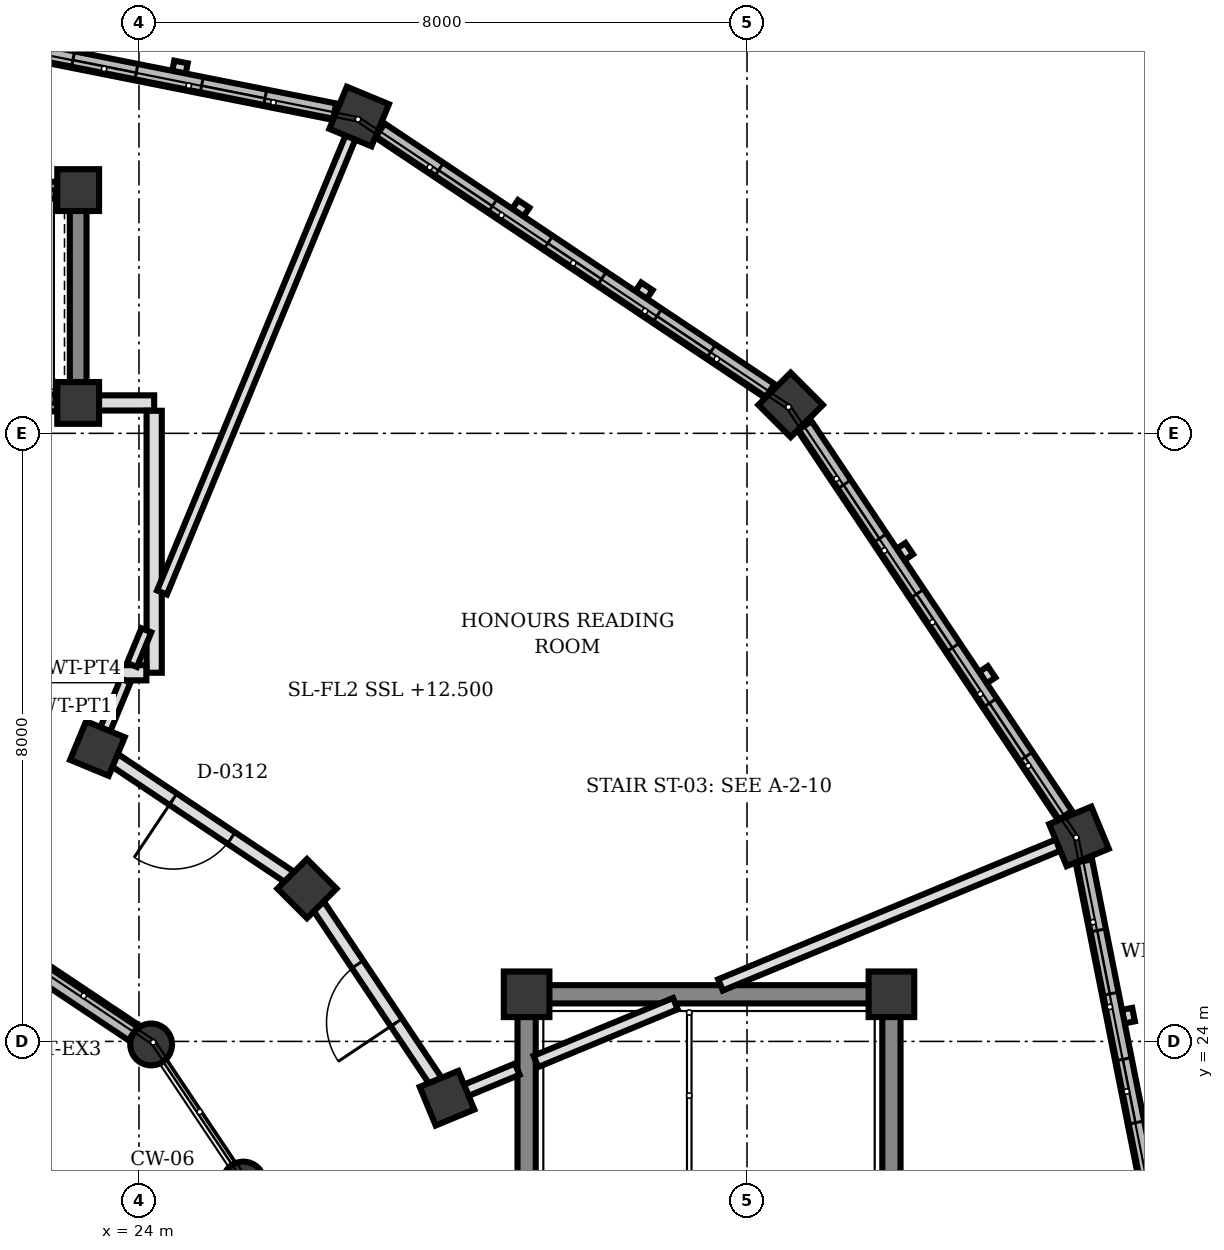
"""IFC4 building model, lengths in metres.
Left out: names, types, materials, properties, quantities, classifications, styles, units other than length and angle.
Written with IfcOpenShell. Run it as: python <this file> out.ifc"""

import sys

from ifc_helpers import new_model, si_unit, direction, frame, frame_2d, origin, origin_2d, place, context, subcontext, project, spatial, rectangle, circle, extrude, element, fill, save


model = new_model("IFC4")
c1 = context("Model", 3, precision=1e-05, world=origin(), true_north=direction((0.0, 1.0)))
c2 = subcontext(c1, "Body", "Model", "MODEL_VIEW")
j1 = project(units=[si_unit("LENGTHUNIT", "METRE"), si_unit("PLANEANGLEUNIT", "RADIAN")], contexts=[c1])
p1 = place(None, origin())
s1 = spatial("IfcSite", under=j1, at=p1, CompositionType="ELEMENT")
p2 = place(p1, origin())
s2 = spatial("IfcBuilding", under=s1, at=p2, CompositionType="ELEMENT")
p3 = place(p2, frame((0.0, 0.0, 12.5)))
s3 = spatial("IfcBuildingStorey", under=s2, at=p3, CompositionType="ELEMENT", Elevation=12.5)
for number, where, z_axis, x_axis in (
    (1, (33.9, 24.62, 0.0), (0.0, 0.0, 1.0), (1.0, 0.0, 0.0)),
    (2, (29.1, 24.62, 0.0), (0.0, 0.0, 1.0), (1.0, 0.0, 0.0)),
):
    element("IfcColumn", number, at=place(p3, frame(where, z_axis=z_axis, x_axis=x_axis)), inside=s3, PredefinedType="COLUMN", context=c2, shape_type="SweptSolid", body=[
        extrude(rectangle(XDim=0.6, YDim=0.6, at=origin_2d()), origin(), (0.0, 0.0, 1.0), 4.0),
    ])
for number, where, z_axis, x_axis in (
    (3, (23.2, 32.4, 0.0), (0.0, 0.0, 1.0), (1.0, 0.0, 0.0)),
    (4, (23.2, 35.2, 0.0), (0.0, 0.0, 1.0), (1.0, 0.0, 0.0)),
):
    element("IfcColumn", number, at=place(p3, frame(where, z_axis=z_axis, x_axis=x_axis)), inside=s3, PredefinedType="COLUMN", context=c2, shape_type="SweptSolid", body=[
        extrude(rectangle(XDim=0.55, YDim=0.55, at=origin_2d()), origin(), (0.0, 0.0, 1.0), 4.0),
    ])
for number, where, z_axis, x_axis in (
    (5, (25.374, 22.143, 0.0), (0.0, 0.0, 1.0), (1.0, 0.0, 0.0)),
    (6, (24.16, 23.96, 0.0), (0.0, 0.0, 1.0), (1.0, 0.0, 0.0)),
):
    element("IfcColumn", number, at=place(p3, frame(where, z_axis=z_axis, x_axis=x_axis)), inside=s3, PredefinedType="COLUMN", context=c2, shape_type="SweptSolid", body=[
        extrude(circle(Radius=0.275, at=origin_2d()), origin(), (0.0, 0.0, 1.0), 3.865),
    ])
for number, where, z_axis, x_axis in (
    (7, (28.053, 23.253, 0.0), (0.0, 0.0, 1.0), (0.924, 0.383, 0.0)),
    (8, (26.21, 26.01, 0.0), (0.0, 0.0, 1.0), (0.707, 0.707, 0.0)),
    (9, (23.453, 27.853, 0.0), (0.0, 0.0, 1.0), (0.383, 0.924, 0.0)),
):
    element("IfcColumn", number, at=place(p3, frame(where, z_axis=z_axis, x_axis=x_axis)), inside=s3, PredefinedType="COLUMN", context=c2, shape_type="SweptSolid", body=[
        extrude(rectangle(XDim=0.55, YDim=0.55, at=origin_2d()), origin(), (0.0, 0.0, 1.0), 4.59),
    ])
for number, where, z_axis, x_axis in (
    (10, (36.368, 26.697, 0.0), (0.0, 0.0, 1.0), (0.924, 0.383, 0.0)),
    (11, (32.574, 32.374, 0.0), (0.0, 0.0, 1.0), (0.707, 0.707, 0.0)),
    (12, (26.897, 36.168, 0.0), (0.0, 0.0, 1.0), (0.383, 0.924, 0.0)),
):
    element("IfcColumn", number, at=place(p3, frame(where, z_axis=z_axis, x_axis=x_axis)), inside=s3, PredefinedType="COLUMN", context=c2, shape_type="SweptSolid", body=[
        extrude(rectangle(XDim=0.6, YDim=0.6, at=origin_2d()), origin(), (0.0, 0.0, 1.0), 6.84),
    ])
p4 = place(p3, frame((36.432, 26.374, 0.0), z_axis=(0.0, 0.0, 1.0), x_axis=(0.195164813773, -0.980770460131, 0.0)))
e13 = element("IfcWall", 13, at=p4, inside=s3, PredefinedType="SOLIDWALL", context=c2, shape_type="SweptSolid", body=[
    extrude(rectangle(XDim=6.17, YDim=0.22, at=frame_2d((3.085, 0.0))), origin(), (0.0, 0.0, 1.0), 6.35),
])
p5 = place(p4, frame((0.932, 0.0, 0.85)))
e14 = element("IfcOpeningElement", 14, at=p5, cuts=e13, PredefinedType="OPENING", context=c2, shape_type="SweptSolid", body=[
    extrude(rectangle(XDim=0.85, YDim=1.25, at=frame_2d((0.425, 0.625))), frame((0.0, 0.12, 0.0), z_axis=(0.0, -1.0, 0.0), x_axis=(1.0, 0.0, 0.0)), (0.0, 0.0, 1.0), 0.24),
])
p6 = place(p4, frame((2.66, 0.0, 0.85)))
e15 = element("IfcOpeningElement", 15, at=p6, cuts=e13, PredefinedType="OPENING", context=c2, shape_type="SweptSolid", body=[
    extrude(rectangle(XDim=0.85, YDim=1.25, at=frame_2d((0.425, 0.625))), frame((0.0, 0.12, 0.0), z_axis=(0.0, -1.0, 0.0), x_axis=(1.0, 0.0, 0.0)), (0.0, 0.0, 1.0), 0.24),
])
p7 = place(p4, frame((4.387, 0.0, 0.85)))
e16 = element("IfcOpeningElement", 16, at=p7, cuts=e13, PredefinedType="OPENING", context=c2, shape_type="SweptSolid", body=[
    extrude(rectangle(XDim=0.85, YDim=1.25, at=frame_2d((0.425, 0.625))), frame((0.0, 0.12, 0.0), z_axis=(0.0, -1.0, 0.0), x_axis=(1.0, 0.0, 0.0)), (0.0, 0.0, 1.0), 0.24),
])
p8 = place(p3, frame((32.757, 32.1, 0.0), z_axis=(0.0, 0.0, 1.0), x_axis=(0.555658736667, -0.831410469242, 0.0)))
e17 = element("IfcWall", 17, at=p8, inside=s3, PredefinedType="SOLIDWALL", context=c2, shape_type="SweptSolid", body=[
    extrude(rectangle(XDim=6.169, YDim=0.22, at=frame_2d((3.084, 0.0))), origin(), (0.0, 0.0, 1.0), 6.35),
])
p9 = place(p8, frame((0.932, 0.0, 0.85)))
e18 = element("IfcOpeningElement", 18, at=p9, cuts=e17, PredefinedType="OPENING", context=c2, shape_type="SweptSolid", body=[
    extrude(rectangle(XDim=0.85, YDim=1.25, at=frame_2d((0.425, 0.625))), frame((0.0, 0.12, 0.0), z_axis=(0.0, -1.0, 0.0), x_axis=(1.0, 0.0, 0.0)), (0.0, 0.0, 1.0), 0.24),
])
p10 = place(p8, frame((2.66, 0.0, 0.85)))
e19 = element("IfcOpeningElement", 19, at=p10, cuts=e17, PredefinedType="OPENING", context=c2, shape_type="SweptSolid", body=[
    extrude(rectangle(XDim=0.85, YDim=1.25, at=frame_2d((0.425, 0.625))), frame((0.0, 0.12, 0.0), z_axis=(0.0, -1.0, 0.0), x_axis=(1.0, 0.0, 0.0)), (0.0, 0.0, 1.0), 0.24),
])
p11 = place(p8, frame((4.387, 0.0, 0.85)))
e20 = element("IfcOpeningElement", 20, at=p11, cuts=e17, PredefinedType="OPENING", context=c2, shape_type="SweptSolid", body=[
    extrude(rectangle(XDim=0.85, YDim=1.25, at=frame_2d((0.425, 0.625))), frame((0.0, 0.12, 0.0), z_axis=(0.0, -1.0, 0.0), x_axis=(1.0, 0.0, 0.0)), (0.0, 0.0, 1.0), 0.24),
])
p12 = place(p3, frame((27.171, 35.985, 0.0), z_axis=(0.0, 0.0, 1.0), x_axis=(0.831392186772, -0.55568609104, 0.0)))
e21 = element("IfcWall", 21, at=p12, inside=s3, PredefinedType="SOLIDWALL", context=c2, shape_type="SweptSolid", body=[
    extrude(rectangle(XDim=6.169, YDim=0.22, at=frame_2d((3.085, 0.0))), origin(), (0.0, 0.0, 1.0), 6.35),
])
p13 = place(p12, frame((0.932, 0.0, 0.85)))
e22 = element("IfcOpeningElement", 22, at=p13, cuts=e21, PredefinedType="OPENING", context=c2, shape_type="SweptSolid", body=[
    extrude(rectangle(XDim=0.85, YDim=1.25, at=frame_2d((0.425, 0.625))), frame((0.0, 0.12, 0.0), z_axis=(0.0, -1.0, 0.0), x_axis=(1.0, 0.0, 0.0)), (0.0, 0.0, 1.0), 0.24),
])
p14 = place(p12, frame((2.66, 0.0, 0.85)))
e23 = element("IfcOpeningElement", 23, at=p14, cuts=e21, PredefinedType="OPENING", context=c2, shape_type="SweptSolid", body=[
    extrude(rectangle(XDim=0.85, YDim=1.25, at=frame_2d((0.425, 0.625))), frame((0.0, 0.12, 0.0), z_axis=(0.0, -1.0, 0.0), x_axis=(1.0, 0.0, 0.0)), (0.0, 0.0, 1.0), 0.24),
])
p15 = place(p12, frame((4.387, 0.0, 0.85)))
e24 = element("IfcOpeningElement", 24, at=p15, cuts=e21, PredefinedType="OPENING", context=c2, shape_type="SweptSolid", body=[
    extrude(rectangle(XDim=0.85, YDim=1.25, at=frame_2d((0.425, 0.625))), frame((0.0, 0.12, 0.0), z_axis=(0.0, -1.0, 0.0), x_axis=(1.0, 0.0, 0.0)), (0.0, 0.0, 1.0), 0.24),
])
p16 = place(p3, frame((23.93, 24.114, 0.0), z_axis=(0.0, 0.0, 1.0), x_axis=(-0.83165874011, 0.555287078904, 0.0)))
e25 = element("IfcWall", 25, at=p16, inside=s3, PredefinedType="SOLIDWALL", context=c2, shape_type="SweptSolid", body=[
    extrude(rectangle(XDim=1.632, YDim=0.24, at=frame_2d((0.816, 0.0))), origin(), (0.0, 0.0, 1.0), 3.375),
])
p17 = place(p3, frame((20.523, 37.436, 0.0), z_axis=(0.0, 0.0, 1.0), x_axis=(0.980770460131, -0.195164813773, 0.0)))
e26 = element("IfcWall", 26, at=p17, inside=s3, PredefinedType="SOLIDWALL", context=c2, shape_type="SweptSolid", body=[
    extrude(rectangle(XDim=6.17, YDim=0.22, at=frame_2d((3.085, 0.0))), origin(), (0.0, 0.0, 1.0), 6.35),
])
p18 = place(p17, frame((0.932, 0.0, 0.85)))
e27 = element("IfcOpeningElement", 27, at=p18, cuts=e26, PredefinedType="OPENING", context=c2, shape_type="SweptSolid", body=[
    extrude(rectangle(XDim=0.85, YDim=1.25, at=frame_2d((0.425, 0.625))), frame((0.0, 0.12, 0.0), z_axis=(0.0, -1.0, 0.0), x_axis=(1.0, 0.0, 0.0)), (0.0, 0.0, 1.0), 0.24),
])
p19 = place(p17, frame((2.66, 0.0, 0.85)))
e28 = element("IfcOpeningElement", 28, at=p19, cuts=e26, PredefinedType="OPENING", context=c2, shape_type="SweptSolid", body=[
    extrude(rectangle(XDim=0.85, YDim=1.25, at=frame_2d((0.425, 0.625))), frame((0.0, 0.12, 0.0), z_axis=(0.0, -1.0, 0.0), x_axis=(1.0, 0.0, 0.0)), (0.0, 0.0, 1.0), 0.24),
])
p20 = place(p17, frame((4.387, 0.0, 0.85)))
e29 = element("IfcOpeningElement", 29, at=p20, cuts=e26, PredefinedType="OPENING", context=c2, shape_type="SweptSolid", body=[
    extrude(rectangle(XDim=0.85, YDim=1.25, at=frame_2d((0.425, 0.625))), frame((0.0, 0.12, 0.0), z_axis=(0.0, -1.0, 0.0), x_axis=(1.0, 0.0, 0.0)), (0.0, 0.0, 1.0), 0.24),
])
p21 = place(p3, frame((29.1, 16.192, 0.0), z_axis=(0.0, 0.0, 1.0), x_axis=(0.0, 1.0, 0.0)))
e30 = element("IfcWall", 30, at=p21, inside=s3, PredefinedType="SHEAR", context=c2, shape_type="SweptSolid", body=[
    extrude(rectangle(XDim=8.136, YDim=0.24, at=frame_2d((4.068, 0.0))), origin(), (0.0, 0.0, 1.0), 3.74),
])
p22 = place(p21, frame((1.012, 0.0, 0.0)))
e31 = element("IfcOpeningElement", 31, at=p22, cuts=e30, PredefinedType="OPENING", context=c2, shape_type="SweptSolid", body=[
    extrude(rectangle(XDim=0.88, YDim=2.1, at=frame_2d((0.44, 1.05))), frame((0.0, 0.13, 0.0), z_axis=(0.0, -1.0, 0.0), x_axis=(1.0, 0.0, 0.0)), (0.0, 0.0, 1.0), 0.26),
])
p23 = place(p3, frame((33.9, 24.328, 0.0), z_axis=(0.0, 0.0, 1.0), x_axis=(0.0, -1.0, 0.0)))
e32 = element("IfcWall", 32, at=p23, inside=s3, PredefinedType="SHEAR", context=c2, shape_type="SweptSolid", body=[
    extrude(rectangle(XDim=8.136, YDim=0.24, at=frame_2d((4.068, 0.0))), origin(), (0.0, 0.0, 1.0), 3.74),
])
p24 = place(p3, frame((33.608, 24.62, 0.0), z_axis=(0.0, 0.0, 1.0), x_axis=(-1.0, 0.0, 0.0)))
e33 = element("IfcWall", 33, at=p24, inside=s3, PredefinedType="SHEAR", context=c2, shape_type="SweptSolid", body=[
    extrude(rectangle(XDim=4.216, YDim=0.24, at=frame_2d((2.108, 0.0))), origin(), (0.0, 0.0, 1.0), 3.74),
])
p25 = place(p3, frame((20.867, 32.4, 0.0), z_axis=(0.0, 0.0, 1.0), x_axis=(1.0, 0.0, 0.0)))
e34 = element("IfcWall", 34, at=p25, inside=s3, PredefinedType="SHEAR", context=c2, shape_type="SweptSolid", body=[
    extrude(rectangle(XDim=2.066, YDim=0.22, at=frame_2d((1.033, 0.0))), origin(), (0.0, 0.0, 1.0), 3.74),
])
p26 = place(p25, frame((0.483, 0.0, 0.0)))
e35 = element("IfcOpeningElement", 35, at=p26, cuts=e34, PredefinedType="OPENING", context=c2, shape_type="SweptSolid", body=[
    extrude(rectangle(XDim=1.1, YDim=2.15, at=frame_2d((0.55, 1.075))), frame((0.0, 0.12, 0.0), z_axis=(0.0, -1.0, 0.0), x_axis=(1.0, 0.0, 0.0)), (0.0, 0.0, 1.0), 0.24),
])
p27 = place(p3, frame((23.2, 32.667, 0.0), z_axis=(0.0, 0.0, 1.0), x_axis=(0.0, 1.0, 0.0)))
e36 = element("IfcWall", 36, at=p27, inside=s3, PredefinedType="SHEAR", context=c2, shape_type="SweptSolid", body=[
    extrude(rectangle(XDim=2.266, YDim=0.22, at=frame_2d((1.133, 0.0))), origin(), (0.0, 0.0, 1.0), 3.74),
])
p28 = place(p3, frame((22.933, 35.2, 0.0), z_axis=(0.0, 0.0, 1.0), x_axis=(-1.0, 0.0, 0.0)))
e37 = element("IfcWall", 37, at=p28, inside=s3, PredefinedType="SHEAR", context=c2, shape_type="SweptSolid", body=[
    extrude(rectangle(XDim=2.066, YDim=0.22, at=frame_2d((1.033, 0.0))), origin(), (0.0, 0.0, 1.0), 3.74),
])
p29 = place(p3, frame((23.467, 32.4, 0.0), z_axis=(0.0, 0.0, 1.0), x_axis=(1.0, 0.0, 0.0)))
e38 = element("IfcWall", 38, at=p29, inside=s3, PredefinedType="PARTITIONING", context=c2, shape_type="SweptSolid", body=[
    extrude(rectangle(XDim=0.733, YDim=0.2, at=frame_2d((0.366, 0.0))), origin(), (0.0, 0.0, 1.0), 3.7),
])
p30 = place(p3, frame((24.2, 28.85, 0.0), z_axis=(0.0, 0.0, 1.0), x_axis=(0.0, 1.0, 0.0)))
e39 = element("IfcWall", 39, at=p30, inside=s3, PredefinedType="PARTITIONING", context=c2, shape_type="SweptSolid", body=[
    extrude(rectangle(XDim=3.447, YDim=0.2, at=frame_2d((1.724, 0.0))), origin(), (0.0, 0.0, 1.0), 3.7),
])
p31 = place(p3, frame((24.097, 28.85, 0.0), z_axis=(0.0, 0.0, 1.0), x_axis=(-1.0, 0.0, 0.0)))
e40 = element("IfcWall", 40, at=p31, inside=s3, PredefinedType="PARTITIONING", context=c2, shape_type="SweptSolid", body=[
    extrude(rectangle(XDim=3.394, YDim=0.2, at=frame_2d((1.697, 0.0))), origin(), (0.0, 0.0, 1.0), 3.7),
])
p32 = place(p31, frame((1.519, 0.0, 0.0)))
e41 = element("IfcOpeningElement", 41, at=p32, cuts=e40, PredefinedType="OPENING", context=c2, shape_type="SweptSolid", body=[
    extrude(rectangle(XDim=0.9, YDim=2.2, at=frame_2d((0.45, 1.1))), frame((0.0, 0.11, 0.0), z_axis=(0.0, -1.0, 0.0), x_axis=(1.0, 0.0, 0.0)), (0.0, 0.0, 1.0), 0.22),
])
p33 = place(p3, frame((28.3, 23.355, 0.0), z_axis=(0.0, 0.0, 1.0), x_axis=(0.924069600435, 0.382224245113, 0.0)))
e42 = element("IfcWall", 42, at=p33, inside=s3, PredefinedType="PARTITIONING", context=c2, shape_type="SweptSolid", body=[
    extrude(rectangle(XDim=0.733, YDim=0.16, at=frame_2d((0.366, 0.0))), origin(), (0.0, 0.0, 1.0), 3.7),
])
p34 = place(p3, frame((29.223, 23.737, 0.0), z_axis=(0.0, 0.0, 1.0), x_axis=(0.923817443679, 0.382833293686, 0.0)))
e43 = element("IfcWall", 43, at=p34, inside=s3, PredefinedType="PARTITIONING", context=c2, shape_type="SweptSolid", body=[
    extrude(rectangle(XDim=1.985, YDim=0.16, at=frame_2d((0.993, 0.0))), origin(), (0.0, 0.0, 1.0), 3.7),
])
p35 = place(p3, frame((31.651, 24.743, 0.0), z_axis=(0.0, 0.0, 1.0), x_axis=(0.923877739946, 0.382687759972, 0.0)))
e44 = element("IfcWall", 44, at=p35, inside=s3, PredefinedType="PARTITIONING", context=c2, shape_type="SweptSolid", body=[
    extrude(rectangle(XDim=4.813, YDim=0.16, at=frame_2d((2.407, 0.0))), origin(), (0.0, 0.0, 1.0), 3.7),
])
p36 = place(p3, frame((23.555, 28.1, 0.0), z_axis=(0.0, 0.0, 1.0), x_axis=(0.38278283439, 0.923838352579, 0.0)))
e45 = element("IfcWall", 45, at=p36, inside=s3, PredefinedType="PARTITIONING", context=c2, shape_type="SweptSolid", body=[
    extrude(rectangle(XDim=0.7, YDim=0.14, at=frame_2d((0.35, 0.0))), origin(), (0.0, 0.0, 1.0), 3.7),
])
p37 = place(p3, frame((23.908, 28.953, 0.0), z_axis=(0.0, 0.0, 1.0), x_axis=(0.3827885685, 0.92383597669, 0.0)))
e46 = element("IfcWall", 46, at=p37, inside=s3, PredefinedType="PARTITIONING", context=c2, shape_type="SweptSolid", body=[
    extrude(rectangle(XDim=0.494, YDim=0.14, at=frame_2d((0.247, 0.0))), origin(), (0.0, 0.0, 1.0), 3.7),
])
p38 = place(p3, frame((24.303, 29.906, 0.0), z_axis=(0.0, 0.0, 1.0), x_axis=(0.382682035927, 0.923880110934, 0.0)))
e47 = element("IfcWall", 47, at=p38, inside=s3, PredefinedType="PARTITIONING", context=c2, shape_type="SweptSolid", body=[
    extrude(rectangle(XDim=6.486, YDim=0.14, at=frame_2d((3.243, 0.0))), origin(), (0.0, 0.0, 1.0), 3.7),
])
p39 = place(p3, frame((27.902, 23.479, 0.0), z_axis=(0.0, 0.0, 1.0), x_axis=(-0.555797002478, 0.831318045056, 0.0)))
e48 = element("IfcWall", 48, at=p39, inside=s3, PredefinedType="PARTITIONING", context=c2, shape_type="SweptSolid", body=[
    extrude(rectangle(XDim=2.773, YDim=0.18, at=frame_2d((1.386, 0.0))), origin(), (0.0, 0.0, 1.0), 3.7),
])
p40 = place(p39, frame((0.926, 0.0, 0.0)))
e49 = element("IfcOpeningElement", 49, at=p40, cuts=e48, PredefinedType="OPENING", context=c2, shape_type="SweptSolid", body=[
    extrude(rectangle(XDim=0.92, YDim=2.1, at=frame_2d((0.46, 1.05))), frame((0.0, 0.1, 0.0), z_axis=(0.0, -1.0, 0.0), x_axis=(1.0, 0.0, 0.0)), (0.0, 0.0, 1.0), 0.2),
])
p41 = place(p3, frame((25.984, 26.161, 0.0), z_axis=(0.0, 0.0, 1.0), x_axis=(-0.831318045056, 0.555797002478, 0.0)))
e50 = element("IfcWall", 50, at=p41, inside=s3, PredefinedType="PARTITIONING", context=c2, shape_type="SweptSolid", body=[
    extrude(rectangle(XDim=2.773, YDim=0.18, at=frame_2d((1.386, 0.0))), origin(), (0.0, 0.0, 1.0), 3.7),
])
p42 = place(p41, frame((0.926, 0.0, 0.0)))
e51 = element("IfcOpeningElement", 51, at=p42, cuts=e50, PredefinedType="OPENING", context=c2, shape_type="SweptSolid", body=[
    extrude(rectangle(XDim=0.92, YDim=2.1, at=frame_2d((0.46, 1.05))), frame((0.0, 0.1, 0.0), z_axis=(0.0, -1.0, 0.0), x_axis=(1.0, 0.0, 0.0)), (0.0, 0.0, 1.0), 0.2),
])
p43 = place(p5, origin())
e52 = element("IfcWindow", 52, at=p43, inside=s3, PartitioningType="SINGLE_PANEL", PredefinedType="WINDOW", context=c2, shape_type="SweptSolid", body=[
    extrude(rectangle(XDim=0.85, YDim=1.25, at=frame_2d((0.425, 0.625))), frame((0.0, 0.03, 0.0), z_axis=(0.0, -1.0, 0.0), x_axis=(1.0, 0.0, 0.0)), (0.0, 0.0, 1.0), 0.06),
])
fill(e14, e52)
p44 = place(p6, origin())
e53 = element("IfcWindow", 53, at=p44, inside=s3, PartitioningType="SINGLE_PANEL", PredefinedType="WINDOW", context=c2, shape_type="SweptSolid", body=[
    extrude(rectangle(XDim=0.85, YDim=1.25, at=frame_2d((0.425, 0.625))), frame((0.0, 0.03, 0.0), z_axis=(0.0, -1.0, 0.0), x_axis=(1.0, 0.0, 0.0)), (0.0, 0.0, 1.0), 0.06),
])
fill(e15, e53)
p45 = place(p9, origin())
e54 = element("IfcWindow", 54, at=p45, inside=s3, PartitioningType="SINGLE_PANEL", PredefinedType="WINDOW", context=c2, shape_type="SweptSolid", body=[
    extrude(rectangle(XDim=0.85, YDim=1.25, at=frame_2d((0.425, 0.625))), frame((0.0, 0.03, 0.0), z_axis=(0.0, -1.0, 0.0), x_axis=(1.0, 0.0, 0.0)), (0.0, 0.0, 1.0), 0.06),
])
fill(e18, e54)
p46 = place(p10, origin())
e55 = element("IfcWindow", 55, at=p46, inside=s3, PartitioningType="SINGLE_PANEL", PredefinedType="WINDOW", context=c2, shape_type="SweptSolid", body=[
    extrude(rectangle(XDim=0.85, YDim=1.25, at=frame_2d((0.425, 0.625))), frame((0.0, 0.03, 0.0), z_axis=(0.0, -1.0, 0.0), x_axis=(1.0, 0.0, 0.0)), (0.0, 0.0, 1.0), 0.06),
])
fill(e19, e55)
p47 = place(p11, origin())
e56 = element("IfcWindow", 56, at=p47, inside=s3, PartitioningType="SINGLE_PANEL", PredefinedType="WINDOW", context=c2, shape_type="SweptSolid", body=[
    extrude(rectangle(XDim=0.85, YDim=1.25, at=frame_2d((0.425, 0.625))), frame((0.0, 0.03, 0.0), z_axis=(0.0, -1.0, 0.0), x_axis=(1.0, 0.0, 0.0)), (0.0, 0.0, 1.0), 0.06),
])
fill(e20, e56)
p48 = place(p13, origin())
e57 = element("IfcWindow", 57, at=p48, inside=s3, PartitioningType="SINGLE_PANEL", PredefinedType="WINDOW", context=c2, shape_type="SweptSolid", body=[
    extrude(rectangle(XDim=0.85, YDim=1.25, at=frame_2d((0.425, 0.625))), frame((0.0, 0.03, 0.0), z_axis=(0.0, -1.0, 0.0), x_axis=(1.0, 0.0, 0.0)), (0.0, 0.0, 1.0), 0.06),
])
fill(e22, e57)
p49 = place(p14, origin())
e58 = element("IfcWindow", 58, at=p49, inside=s3, PartitioningType="SINGLE_PANEL", PredefinedType="WINDOW", context=c2, shape_type="SweptSolid", body=[
    extrude(rectangle(XDim=0.85, YDim=1.25, at=frame_2d((0.425, 0.625))), frame((0.0, 0.03, 0.0), z_axis=(0.0, -1.0, 0.0), x_axis=(1.0, 0.0, 0.0)), (0.0, 0.0, 1.0), 0.06),
])
fill(e23, e58)
p50 = place(p15, origin())
e59 = element("IfcWindow", 59, at=p50, inside=s3, PartitioningType="SINGLE_PANEL", PredefinedType="WINDOW", context=c2, shape_type="SweptSolid", body=[
    extrude(rectangle(XDim=0.85, YDim=1.25, at=frame_2d((0.425, 0.625))), frame((0.0, 0.03, 0.0), z_axis=(0.0, -1.0, 0.0), x_axis=(1.0, 0.0, 0.0)), (0.0, 0.0, 1.0), 0.06),
])
fill(e24, e59)
p51 = place(p19, origin())
e60 = element("IfcWindow", 60, at=p51, inside=s3, PartitioningType="SINGLE_PANEL", PredefinedType="WINDOW", context=c2, shape_type="SweptSolid", body=[
    extrude(rectangle(XDim=0.85, YDim=1.25, at=frame_2d((0.425, 0.625))), frame((0.0, 0.03, 0.0), z_axis=(0.0, -1.0, 0.0), x_axis=(1.0, 0.0, 0.0)), (0.0, 0.0, 1.0), 0.06),
])
fill(e28, e60)
p52 = place(p20, origin())
e61 = element("IfcWindow", 61, at=p52, inside=s3, PartitioningType="SINGLE_PANEL", PredefinedType="WINDOW", context=c2, shape_type="SweptSolid", body=[
    extrude(rectangle(XDim=0.85, YDim=1.25, at=frame_2d((0.425, 0.625))), frame((0.0, 0.03, 0.0), z_axis=(0.0, -1.0, 0.0), x_axis=(1.0, 0.0, 0.0)), (0.0, 0.0, 1.0), 0.06),
])
fill(e29, e61)
p53 = place(p40, origin())
e62 = element("IfcDoor", 62, at=p53, inside=s3, OperationType="SINGLE_SWING_LEFT", PredefinedType="DOOR", context=c2, shape_type="SweptSolid", body=[
    extrude(rectangle(XDim=0.92, YDim=2.1, at=frame_2d((0.46, 1.05))), frame((0.0, 0.025, 0.0), z_axis=(0.0, -1.0, 0.0), x_axis=(1.0, 0.0, 0.0)), (0.0, 0.0, 1.0), 0.05),
])
fill(e49, e62)
p54 = place(p42, origin())
e63 = element("IfcDoor", 63, at=p54, inside=s3, OperationType="SINGLE_SWING_RIGHT", PredefinedType="DOOR", context=c2, shape_type="SweptSolid", body=[
    extrude(rectangle(XDim=0.92, YDim=2.1, at=frame_2d((0.46, 1.05))), frame((0.0, 0.025, 0.0), z_axis=(0.0, -1.0, 0.0), x_axis=(1.0, 0.0, 0.0)), (0.0, 0.0, 1.0), 0.05),
])
fill(e51, e63)
save(model, sys.argv[1])
